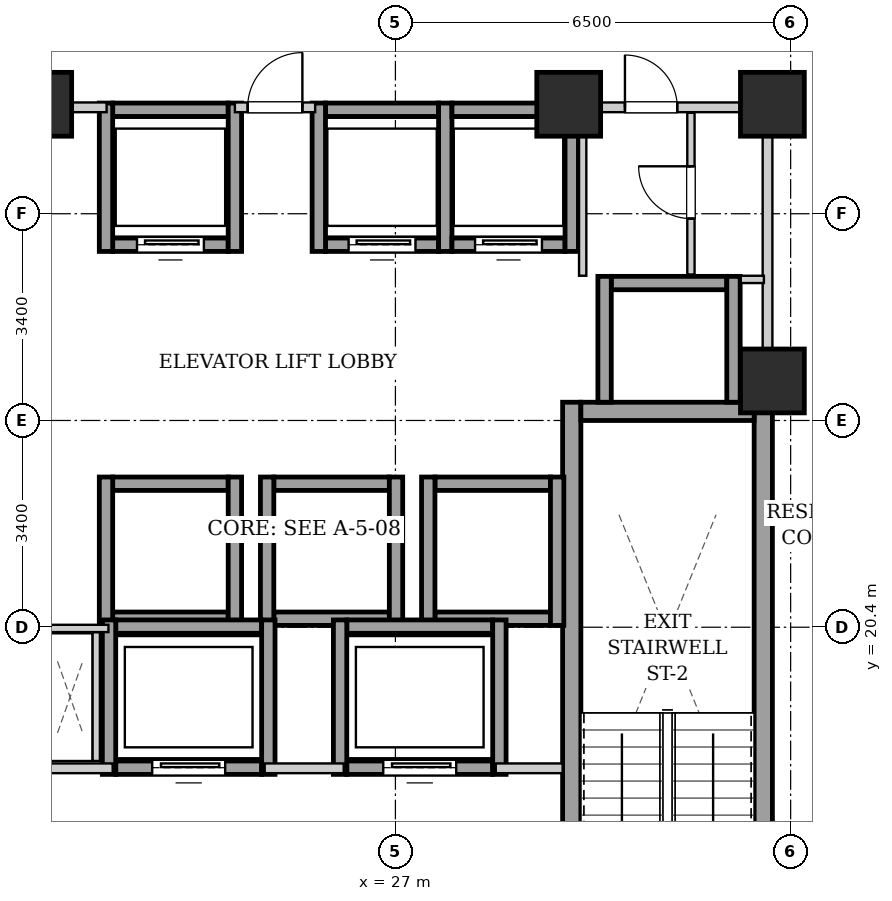
"""IFC4 building model, lengths in metres.
Left out: names, types, materials, properties, quantities, classifications, styles, units other than length and angle.
Written with IfcOpenShell. Run it as: python <this file> out.ifc"""

import sys

from ifc_helpers import new_model, si_unit, direction, frame, frame_2d, origin, origin_2d, place, context, subcontext, project, spatial, rectangle, extrude, element, fill, save


model = new_model("IFC4")
c1 = context("Model", 3, precision=1e-05, world=origin(), true_north=direction((0.0, 1.0)))
c2 = subcontext(c1, "Body", "Model", "MODEL_VIEW")
j1 = project(units=[si_unit("LENGTHUNIT", "METRE"), si_unit("PLANEANGLEUNIT", "RADIAN")], contexts=[c1])
p1 = place(None, origin())
s1 = spatial("IfcSite", under=j1, at=p1, CompositionType="ELEMENT")
p2 = place(p1, origin())
s2 = spatial("IfcBuilding", under=s1, at=p2, CompositionType="ELEMENT")
p3 = place(p2, frame((0.0, 0.0, 75.1)))
s3 = spatial("IfcBuildingStorey", under=s2, at=p3, CompositionType="ELEMENT", Elevation=75.1)
for number, where, z_axis, x_axis in (
    (1, (21.15, 29.0, 0.0), (0.0, 0.0, 1.0), (1.0, 0.0, 0.0)),
    (2, (29.85, 29.0, 0.0), (0.0, 0.0, 1.0), (1.0, 0.0, 0.0)),
    (3, (33.2, 29.0, 0.0), (0.0, 0.0, 1.0), (1.0, 0.0, 0.0)),
    (4, (33.2, 24.45, 0.0), (0.0, 0.0, 1.0), (1.0, 0.0, 0.0)),
):
    element("IfcColumn", number, at=place(p3, frame(where, z_axis=z_axis, x_axis=x_axis)), inside=s3, PredefinedType="COLUMN", context=c2, shape_type="SweptSolid", body=[
        extrude(rectangle(XDim=1.05, YDim=1.05, at=origin_2d()), origin(), (0.0, 0.0, 1.0), 3.2),
    ])
for number, where, z_axis, x_axis in (
    (5, (29.9, 15.1, 0.0), (0.0, 0.0, 1.0), (0.0, 1.0, 0.0)),
    (6, (33.05, 15.1, 0.0), (0.0, 0.0, 1.0), (0.0, 1.0, 0.0)),
):
    element("IfcWall", number, at=place(p3, frame(where, z_axis=z_axis, x_axis=x_axis)), inside=s3, PredefinedType="SHEAR", context=c2, shape_type="SweptSolid", body=[
        extrude(rectangle(XDim=9.0, YDim=0.3, at=frame_2d((4.5, 0.0))), origin(), (0.0, 0.0, 1.0), 2.94),
    ])
p4 = place(p3, frame((30.05, 23.95, 0.0), z_axis=(0.0, 0.0, 1.0), x_axis=(1.0, 0.0, 0.0)))
e7 = element("IfcWall", 7, at=p4, inside=s3, PredefinedType="SHEAR", context=c2, shape_type="SweptSolid", body=[
    extrude(rectangle(XDim=2.85, YDim=0.3, at=frame_2d((1.425, 0.0))), origin(), (0.0, 0.0, 1.0), 2.94),
])
p5 = place(p3, frame((22.35, 26.69, 0.0), z_axis=(0.0, 0.0, 1.0), x_axis=(1.0, 0.0, 0.0)))
e8 = element("IfcWall", 8, at=p5, inside=s3, PredefinedType="SHEAR", context=c2, shape_type="SweptSolid", body=[
    extrude(rectangle(XDim=1.9, YDim=0.22, at=frame_2d((0.95, 0.0))), origin(), (0.0, 0.0, 1.0), 2.94),
])
p6 = place(p5, frame((0.4, 0.0, 0.0)))
e9 = element("IfcOpeningElement", 9, at=p6, cuts=e8, PredefinedType="OPENING", context=c2, shape_type="SweptSolid", body=[
    extrude(rectangle(XDim=1.1, YDim=2.15, at=frame_2d((0.55, 1.075))), frame((0.0, 0.12, 0.0), z_axis=(0.0, -1.0, 0.0), x_axis=(1.0, 0.0, 0.0)), (0.0, 0.0, 1.0), 0.24),
])
p7 = place(p3, frame((22.35, 28.91, 0.0), z_axis=(0.0, 0.0, 1.0), x_axis=(1.0, 0.0, 0.0)))
e10 = element("IfcWall", 10, at=p7, inside=s3, PredefinedType="SHEAR", context=c2, shape_type="SweptSolid", body=[
    extrude(rectangle(XDim=1.9, YDim=0.22, at=frame_2d((0.95, 0.0))), origin(), (0.0, 0.0, 1.0), 2.94),
])
for number, where, z_axis, x_axis in (
    (11, (22.24, 26.58, 0.0), (0.0, 0.0, 1.0), (0.0, 1.0, 0.0)),
    (12, (24.36, 26.58, 0.0), (0.0, 0.0, 1.0), (0.0, 1.0, 0.0)),
):
    element("IfcWall", number, at=place(p3, frame(where, z_axis=z_axis, x_axis=x_axis)), inside=s3, PredefinedType="SHEAR", context=c2, shape_type="SweptSolid", body=[
        extrude(rectangle(XDim=2.44, YDim=0.22, at=frame_2d((1.22, 0.0))), origin(), (0.0, 0.0, 1.0), 2.94),
    ])
p8 = place(p3, frame((25.85, 26.69, 0.0), z_axis=(0.0, 0.0, 1.0), x_axis=(1.0, 0.0, 0.0)))
e13 = element("IfcWall", 13, at=p8, inside=s3, PredefinedType="SHEAR", context=c2, shape_type="SweptSolid", body=[
    extrude(rectangle(XDim=1.86, YDim=0.22, at=frame_2d((0.93, 0.0))), origin(), (0.0, 0.0, 1.0), 2.94),
])
p9 = place(p8, frame((0.38, 0.0, 0.0)))
e14 = element("IfcOpeningElement", 14, at=p9, cuts=e13, PredefinedType="OPENING", context=c2, shape_type="SweptSolid", body=[
    extrude(rectangle(XDim=1.1, YDim=2.15, at=frame_2d((0.55, 1.075))), frame((0.0, 0.12, 0.0), z_axis=(0.0, -1.0, 0.0), x_axis=(1.0, 0.0, 0.0)), (0.0, 0.0, 1.0), 0.24),
])
p10 = place(p3, frame((25.85, 28.91, 0.0), z_axis=(0.0, 0.0, 1.0), x_axis=(1.0, 0.0, 0.0)))
e15 = element("IfcWall", 15, at=p10, inside=s3, PredefinedType="SHEAR", context=c2, shape_type="SweptSolid", body=[
    extrude(rectangle(XDim=1.86, YDim=0.22, at=frame_2d((0.93, 0.0))), origin(), (0.0, 0.0, 1.0), 2.94),
])
for number, where, z_axis, x_axis in (
    (16, (25.74, 26.58, 0.0), (0.0, 0.0, 1.0), (0.0, 1.0, 0.0)),
    (17, (27.82, 26.58, 0.0), (0.0, 0.0, 1.0), (0.0, 1.0, 0.0)),
):
    element("IfcWall", number, at=place(p3, frame(where, z_axis=z_axis, x_axis=x_axis)), inside=s3, PredefinedType="SHEAR", context=c2, shape_type="SweptSolid", body=[
        extrude(rectangle(XDim=2.44, YDim=0.22, at=frame_2d((1.22, 0.0))), origin(), (0.0, 0.0, 1.0), 2.94),
    ])
p11 = place(p3, frame((27.93, 26.69, 0.0), z_axis=(0.0, 0.0, 1.0), x_axis=(1.0, 0.0, 0.0)))
e18 = element("IfcWall", 18, at=p11, inside=s3, PredefinedType="SHEAR", context=c2, shape_type="SweptSolid", body=[
    extrude(rectangle(XDim=1.86, YDim=0.22, at=frame_2d((0.93, 0.0))), origin(), (0.0, 0.0, 1.0), 2.94),
])
p12 = place(p11, frame((0.38, 0.0, 0.0)))
e19 = element("IfcOpeningElement", 19, at=p12, cuts=e18, PredefinedType="OPENING", context=c2, shape_type="SweptSolid", body=[
    extrude(rectangle(XDim=1.1, YDim=2.15, at=frame_2d((0.55, 1.075))), frame((0.0, 0.12, 0.0), z_axis=(0.0, -1.0, 0.0), x_axis=(1.0, 0.0, 0.0)), (0.0, 0.0, 1.0), 0.24),
])
p13 = place(p3, frame((27.93, 28.91, 0.0), z_axis=(0.0, 0.0, 1.0), x_axis=(1.0, 0.0, 0.0)))
e20 = element("IfcWall", 20, at=p13, inside=s3, PredefinedType="SHEAR", context=c2, shape_type="SweptSolid", body=[
    extrude(rectangle(XDim=1.86, YDim=0.22, at=frame_2d((0.93, 0.0))), origin(), (0.0, 0.0, 1.0), 2.94),
])
p14 = place(p3, frame((29.9, 26.58, 0.0), z_axis=(0.0, 0.0, 1.0), x_axis=(0.0, 1.0, 0.0)))
e21 = element("IfcWall", 21, at=p14, inside=s3, PredefinedType="SHEAR", context=c2, shape_type="SweptSolid", body=[
    extrude(rectangle(XDim=2.44, YDim=0.22, at=frame_2d((1.22, 0.0))), origin(), (0.0, 0.0, 1.0), 2.94),
])
for number, where, z_axis, x_axis in (
    (22, (22.35, 20.54, 0.0), (0.0, 0.0, 1.0), (1.0, 0.0, 0.0)),
    (23, (22.35, 22.76, 0.0), (0.0, 0.0, 1.0), (1.0, 0.0, 0.0)),
):
    element("IfcWall", number, at=place(p3, frame(where, z_axis=z_axis, x_axis=x_axis)), inside=s3, PredefinedType="SHEAR", context=c2, shape_type="SweptSolid", body=[
        extrude(rectangle(XDim=1.9, YDim=0.22, at=frame_2d((0.95, 0.0))), origin(), (0.0, 0.0, 1.0), 2.94),
    ])
for number, where, z_axis, x_axis in (
    (24, (22.24, 20.43, 0.0), (0.0, 0.0, 1.0), (0.0, 1.0, 0.0)),
    (25, (24.36, 20.43, 0.0), (0.0, 0.0, 1.0), (0.0, 1.0, 0.0)),
):
    element("IfcWall", number, at=place(p3, frame(where, z_axis=z_axis, x_axis=x_axis)), inside=s3, PredefinedType="SHEAR", context=c2, shape_type="SweptSolid", body=[
        extrude(rectangle(XDim=2.44, YDim=0.22, at=frame_2d((1.22, 0.0))), origin(), (0.0, 0.0, 1.0), 2.94),
    ])
for number, where, z_axis, x_axis in (
    (26, (25.0, 20.54, 0.0), (0.0, 0.0, 1.0), (1.0, 0.0, 0.0)),
    (27, (25.0, 22.76, 0.0), (0.0, 0.0, 1.0), (1.0, 0.0, 0.0)),
):
    element("IfcWall", number, at=place(p3, frame(where, z_axis=z_axis, x_axis=x_axis)), inside=s3, PredefinedType="SHEAR", context=c2, shape_type="SweptSolid", body=[
        extrude(rectangle(XDim=1.9, YDim=0.22, at=frame_2d((0.95, 0.0))), origin(), (0.0, 0.0, 1.0), 2.94),
    ])
for number, where, z_axis, x_axis in (
    (28, (24.89, 20.43, 0.0), (0.0, 0.0, 1.0), (0.0, 1.0, 0.0)),
    (29, (27.01, 20.43, 0.0), (0.0, 0.0, 1.0), (0.0, 1.0, 0.0)),
):
    element("IfcWall", number, at=place(p3, frame(where, z_axis=z_axis, x_axis=x_axis)), inside=s3, PredefinedType="SHEAR", context=c2, shape_type="SweptSolid", body=[
        extrude(rectangle(XDim=2.44, YDim=0.22, at=frame_2d((1.22, 0.0))), origin(), (0.0, 0.0, 1.0), 2.94),
    ])
for number, where, z_axis, x_axis in (
    (30, (27.65, 20.54, 0.0), (0.0, 0.0, 1.0), (1.0, 0.0, 0.0)),
    (31, (27.65, 22.76, 0.0), (0.0, 0.0, 1.0), (1.0, 0.0, 0.0)),
):
    element("IfcWall", number, at=place(p3, frame(where, z_axis=z_axis, x_axis=x_axis)), inside=s3, PredefinedType="SHEAR", context=c2, shape_type="SweptSolid", body=[
        extrude(rectangle(XDim=1.9, YDim=0.22, at=frame_2d((0.95, 0.0))), origin(), (0.0, 0.0, 1.0), 2.94),
    ])
for number, where, z_axis, x_axis in (
    (32, (27.54, 20.43, 0.0), (0.0, 0.0, 1.0), (0.0, 1.0, 0.0)),
    (33, (29.66, 20.43, 0.0), (0.0, 0.0, 1.0), (0.0, 1.0, 0.0)),
):
    element("IfcWall", number, at=place(p3, frame(where, z_axis=z_axis, x_axis=x_axis)), inside=s3, PredefinedType="SHEAR", context=c2, shape_type="SweptSolid", body=[
        extrude(rectangle(XDim=2.44, YDim=0.22, at=frame_2d((1.22, 0.0))), origin(), (0.0, 0.0, 1.0), 2.94),
    ])
p15 = place(p3, frame((30.55, 26.06, 0.0), z_axis=(0.0, 0.0, 1.0), x_axis=(1.0, 0.0, 0.0)))
e34 = element("IfcWall", 34, at=p15, inside=s3, PredefinedType="SHEAR", context=c2, shape_type="SweptSolid", body=[
    extrude(rectangle(XDim=1.9, YDim=0.22, at=frame_2d((0.95, 0.0))), origin(), (0.0, 0.0, 1.0), 2.94),
])
for number, where, z_axis, x_axis in (
    (35, (30.44, 24.1, 0.0), (0.0, 0.0, 1.0), (0.0, 1.0, 0.0)),
    (36, (32.56, 24.1, 0.0), (0.0, 0.0, 1.0), (0.0, 1.0, 0.0)),
):
    element("IfcWall", number, at=place(p3, frame(where, z_axis=z_axis, x_axis=x_axis)), inside=s3, PredefinedType="SHEAR", context=c2, shape_type="SweptSolid", body=[
        extrude(rectangle(XDim=2.07, YDim=0.22, at=frame_2d((1.035, 0.0))), origin(), (0.0, 0.0, 1.0), 2.94),
    ])
p16 = place(p3, frame((22.4, 18.09, 0.0), z_axis=(0.0, 0.0, 1.0), x_axis=(1.0, 0.0, 0.0)))
e37 = element("IfcWall", 37, at=p16, inside=s3, PredefinedType="SHEAR", context=c2, shape_type="SweptSolid", body=[
    extrude(rectangle(XDim=2.4, YDim=0.22, at=frame_2d((1.2, 0.0))), origin(), (0.0, 0.0, 1.0), 2.94),
])
p17 = place(p16, frame((0.6, 0.0, 0.0)))
e38 = element("IfcOpeningElement", 38, at=p17, cuts=e37, PredefinedType="OPENING", context=c2, shape_type="SweptSolid", body=[
    extrude(rectangle(XDim=1.2, YDim=2.15, at=frame_2d((0.6, 1.075))), frame((0.0, 0.12, 0.0), z_axis=(0.0, -1.0, 0.0), x_axis=(1.0, 0.0, 0.0)), (0.0, 0.0, 1.0), 0.24),
])
p18 = place(p3, frame((22.4, 20.41, 0.0), z_axis=(0.0, 0.0, 1.0), x_axis=(1.0, 0.0, 0.0)))
e39 = element("IfcWall", 39, at=p18, inside=s3, PredefinedType="SHEAR", context=c2, shape_type="SweptSolid", body=[
    extrude(rectangle(XDim=2.4, YDim=0.22, at=frame_2d((1.2, 0.0))), origin(), (0.0, 0.0, 1.0), 2.94),
])
for number, where, z_axis, x_axis in (
    (40, (22.29, 17.98, 0.0), (0.0, 0.0, 1.0), (0.0, 1.0, 0.0)),
    (41, (24.91, 17.98, 0.0), (0.0, 0.0, 1.0), (0.0, 1.0, 0.0)),
):
    element("IfcWall", number, at=place(p3, frame(where, z_axis=z_axis, x_axis=x_axis)), inside=s3, PredefinedType="SHEAR", context=c2, shape_type="SweptSolid", body=[
        extrude(rectangle(XDim=2.54, YDim=0.22, at=frame_2d((1.27, 0.0))), origin(), (0.0, 0.0, 1.0), 2.94),
    ])
p19 = place(p3, frame((26.2, 18.09, 0.0), z_axis=(0.0, 0.0, 1.0), x_axis=(1.0, 0.0, 0.0)))
e42 = element("IfcWall", 42, at=p19, inside=s3, PredefinedType="SHEAR", context=c2, shape_type="SweptSolid", body=[
    extrude(rectangle(XDim=2.4, YDim=0.22, at=frame_2d((1.2, 0.0))), origin(), (0.0, 0.0, 1.0), 2.94),
])
p20 = place(p19, frame((0.6, 0.0, 0.0)))
e43 = element("IfcOpeningElement", 43, at=p20, cuts=e42, PredefinedType="OPENING", context=c2, shape_type="SweptSolid", body=[
    extrude(rectangle(XDim=1.2, YDim=2.15, at=frame_2d((0.6, 1.075))), frame((0.0, 0.12, 0.0), z_axis=(0.0, -1.0, 0.0), x_axis=(1.0, 0.0, 0.0)), (0.0, 0.0, 1.0), 0.24),
])
p21 = place(p3, frame((26.2, 20.41, 0.0), z_axis=(0.0, 0.0, 1.0), x_axis=(1.0, 0.0, 0.0)))
e44 = element("IfcWall", 44, at=p21, inside=s3, PredefinedType="SHEAR", context=c2, shape_type="SweptSolid", body=[
    extrude(rectangle(XDim=2.4, YDim=0.22, at=frame_2d((1.2, 0.0))), origin(), (0.0, 0.0, 1.0), 2.94),
])
for number, where, z_axis, x_axis in (
    (45, (26.09, 17.98, 0.0), (0.0, 0.0, 1.0), (0.0, 1.0, 0.0)),
    (46, (28.71, 17.98, 0.0), (0.0, 0.0, 1.0), (0.0, 1.0, 0.0)),
):
    element("IfcWall", number, at=place(p3, frame(where, z_axis=z_axis, x_axis=x_axis)), inside=s3, PredefinedType="SHEAR", context=c2, shape_type="SweptSolid", body=[
        extrude(rectangle(XDim=2.54, YDim=0.22, at=frame_2d((1.27, 0.0))), origin(), (0.0, 0.0, 1.0), 2.94),
    ])
p22 = place(p3, frame((21.25, 18.08, 0.0), z_axis=(0.0, 0.0, 1.0), x_axis=(1.0, 0.0, 0.0)))
e47 = element("IfcWall", 47, at=p22, inside=s3, PredefinedType="PARTITIONING", context=c2, shape_type="SweptSolid", body=[
    extrude(rectangle(XDim=1.1, YDim=0.16, at=frame_2d((0.55, 0.0))), origin(), (0.0, 0.0, 1.0), 2.94),
])
p23 = place(p3, frame((24.85, 18.08, 0.0), z_axis=(0.0, 0.0, 1.0), x_axis=(1.0, 0.0, 0.0)))
e48 = element("IfcWall", 48, at=p23, inside=s3, PredefinedType="PARTITIONING", context=c2, shape_type="SweptSolid", body=[
    extrude(rectangle(XDim=1.3, YDim=0.16, at=frame_2d((0.65, 0.0))), origin(), (0.0, 0.0, 1.0), 2.94),
])
p24 = place(p3, frame((28.65, 18.08, 0.0), z_axis=(0.0, 0.0, 1.0), x_axis=(1.0, 0.0, 0.0)))
e49 = element("IfcWall", 49, at=p24, inside=s3, PredefinedType="PARTITIONING", context=c2, shape_type="SweptSolid", body=[
    extrude(rectangle(XDim=1.1, YDim=0.16, at=frame_2d((0.55, 0.0))), origin(), (0.0, 0.0, 1.0), 2.94),
])
p25 = place(p3, frame((33.12, 24.12, 0.0), z_axis=(0.0, 0.0, 1.0), x_axis=(0.0, 1.0, 0.0)))
e50 = element("IfcWall", 50, at=p25, inside=s3, PredefinedType="PARTITIONING", context=c2, shape_type="SweptSolid", body=[
    extrude(rectangle(XDim=4.76, YDim=0.16, at=frame_2d((2.38, 0.0))), origin(), (0.0, 0.0, 1.0), 2.94),
])
p26 = place(p3, frame((24.36, 28.95, 0.0), z_axis=(0.0, 0.0, 1.0), x_axis=(1.0, 0.0, 0.0)))
e51 = element("IfcWall", 51, at=p26, inside=s3, PredefinedType="PARTITIONING", context=c2, shape_type="SweptSolid", body=[
    extrude(rectangle(XDim=1.32, YDim=0.16, at=frame_2d((0.66, 0.0))), origin(), (0.0, 0.0, 1.0), 2.309),
])
p27 = place(p26, frame((0.21, 0.0, 0.0)))
e52 = element("IfcOpeningElement", 52, at=p27, cuts=e51, PredefinedType="OPENING", context=c2, shape_type="SweptSolid", body=[
    extrude(rectangle(XDim=0.9, YDim=2.05, at=frame_2d((0.45, 1.025))), frame((0.0, 0.09, 0.0), z_axis=(0.0, -1.0, 0.0), x_axis=(1.0, 0.0, 0.0)), (0.0, 0.0, 1.0), 0.18),
])
p28 = place(p3, frame((17.96, 28.95, 0.0), z_axis=(0.0, 0.0, 1.0), x_axis=(1.0, 0.0, 0.0)))
e53 = element("IfcWall", 53, at=p28, inside=s3, PredefinedType="PARTITIONING", context=c2, shape_type="SweptSolid", body=[
    extrude(rectangle(XDim=4.29, YDim=0.16, at=frame_2d((2.145, 0.0))), origin(), (0.0, 0.0, 1.0), 2.309),
])
p29 = place(p28, frame((1.645, 0.0, 0.0)))
e54 = element("IfcOpeningElement", 54, at=p29, cuts=e53, PredefinedType="OPENING", context=c2, shape_type="SweptSolid", body=[
    extrude(rectangle(XDim=0.86, YDim=2.05, at=frame_2d((0.43, 1.025))), frame((0.0, 0.09, 0.0), z_axis=(0.0, -1.0, 0.0), x_axis=(1.0, 0.0, 0.0)), (0.0, 0.0, 1.0), 0.18),
])
p30 = place(p3, frame((22.08, 18.2, 0.0), z_axis=(0.0, 0.0, 1.0), x_axis=(0.0, 1.0, 0.0)))
e55 = element("IfcWall", 55, at=p30, inside=s3, PredefinedType="PARTITIONING", context=c2, shape_type="SweptSolid", body=[
    extrude(rectangle(XDim=2.12, YDim=0.12, at=frame_2d((1.06, 0.0))), origin(), (0.0, 0.0, 1.0), 2.94),
])
p31 = place(p3, frame((22.28, 20.38, 0.0), z_axis=(0.0, 0.0, 1.0), x_axis=(-1.0, 0.0, 0.0)))
e56 = element("IfcWall", 56, at=p31, inside=s3, PredefinedType="PARTITIONING", context=c2, shape_type="SweptSolid", body=[
    extrude(rectangle(XDim=1.02, YDim=0.12, at=frame_2d((0.51, 0.0))), origin(), (0.0, 0.0, 1.0), 2.94),
])
p32 = place(p3, frame((30.08, 26.18, 0.0), z_axis=(0.0, 0.0, 1.0), x_axis=(0.0, 1.0, 0.0)))
e57 = element("IfcWall", 57, at=p32, inside=s3, PredefinedType="PARTITIONING", context=c2, shape_type="SweptSolid", body=[
    extrude(rectangle(XDim=2.68, YDim=0.12, at=frame_2d((1.34, 0.0))), origin(), (0.0, 0.0, 1.0), 2.94),
])
p33 = place(p3, frame((32.68, 26.12, 0.0), z_axis=(0.0, 0.0, 1.0), x_axis=(1.0, 0.0, 0.0)))
e58 = element("IfcWall", 58, at=p33, inside=s3, PredefinedType="PARTITIONING", context=c2, shape_type="SweptSolid", body=[
    extrude(rectangle(XDim=0.38, YDim=0.12, at=frame_2d((0.19, 0.0))), origin(), (0.0, 0.0, 1.0), 2.94),
])
p34 = place(p3, frame((31.86, 26.2, 0.0), z_axis=(0.0, 0.0, 1.0), x_axis=(0.0, 1.0, 0.0)))
e59 = element("IfcWall", 59, at=p34, inside=s3, PredefinedType="PARTITIONING", context=c2, shape_type="SweptSolid", body=[
    extrude(rectangle(XDim=2.66, YDim=0.12, at=frame_2d((1.33, 0.0))), origin(), (0.0, 0.0, 1.0), 2.94),
])
p35 = place(p34, frame((0.92, 0.0, 0.0)))
e60 = element("IfcOpeningElement", 60, at=p35, cuts=e59, PredefinedType="OPENING", context=c2, shape_type="SweptSolid", body=[
    extrude(rectangle(XDim=0.86, YDim=2.05, at=frame_2d((0.43, 1.025))), frame((0.0, 0.07, 0.0), z_axis=(0.0, -1.0, 0.0), x_axis=(1.0, 0.0, 0.0)), (0.0, 0.0, 1.0), 0.14),
])
p36 = place(p3, frame((30.08, 28.95, 0.0), z_axis=(0.0, 0.0, 1.0), x_axis=(1.0, 0.0, 0.0)))
e61 = element("IfcWall", 61, at=p36, inside=s3, PredefinedType="PARTITIONING", context=c2, shape_type="SweptSolid", body=[
    extrude(rectangle(XDim=2.96, YDim=0.16, at=frame_2d((1.48, 0.0))), origin(), (0.0, 0.0, 1.0), 2.94),
])
p37 = place(p36, frame((0.695, 0.0, 0.0)))
e62 = element("IfcOpeningElement", 62, at=p37, cuts=e61, PredefinedType="OPENING", context=c2, shape_type="SweptSolid", body=[
    extrude(rectangle(XDim=0.86, YDim=2.05, at=frame_2d((0.43, 1.025))), frame((0.0, 0.09, 0.0), z_axis=(0.0, -1.0, 0.0), x_axis=(1.0, 0.0, 0.0)), (0.0, 0.0, 1.0), 0.18),
])
p38 = place(p6, origin())
e63 = element("IfcDoor", 63, at=p38, inside=s3, OperationType="SLIDING_TO_LEFT", PredefinedType="DOOR", context=c2, shape_type="SweptSolid", body=[
    extrude(rectangle(XDim=1.1, YDim=2.15, at=frame_2d((0.55, 1.075))), frame((0.0, 0.025, 0.0), z_axis=(0.0, -1.0, 0.0), x_axis=(1.0, 0.0, 0.0)), (0.0, 0.0, 1.0), 0.05),
])
fill(e9, e63)
p39 = place(p9, origin())
e64 = element("IfcDoor", 64, at=p39, inside=s3, OperationType="SLIDING_TO_LEFT", PredefinedType="DOOR", context=c2, shape_type="SweptSolid", body=[
    extrude(rectangle(XDim=1.1, YDim=2.15, at=frame_2d((0.55, 1.075))), frame((0.0, 0.025, 0.0), z_axis=(0.0, -1.0, 0.0), x_axis=(1.0, 0.0, 0.0)), (0.0, 0.0, 1.0), 0.05),
])
fill(e14, e64)
p40 = place(p12, origin())
e65 = element("IfcDoor", 65, at=p40, inside=s3, OperationType="SLIDING_TO_LEFT", PredefinedType="DOOR", context=c2, shape_type="SweptSolid", body=[
    extrude(rectangle(XDim=1.1, YDim=2.15, at=frame_2d((0.55, 1.075))), frame((0.0, 0.025, 0.0), z_axis=(0.0, -1.0, 0.0), x_axis=(1.0, 0.0, 0.0)), (0.0, 0.0, 1.0), 0.05),
])
fill(e19, e65)
p41 = place(p17, origin())
e66 = element("IfcDoor", 66, at=p41, inside=s3, OperationType="SLIDING_TO_LEFT", PredefinedType="DOOR", context=c2, shape_type="SweptSolid", body=[
    extrude(rectangle(XDim=1.2, YDim=2.15, at=frame_2d((0.6, 1.075))), frame((0.0, 0.025, 0.0), z_axis=(0.0, -1.0, 0.0), x_axis=(1.0, 0.0, 0.0)), (0.0, 0.0, 1.0), 0.05),
])
fill(e38, e66)
p42 = place(p20, origin())
e67 = element("IfcDoor", 67, at=p42, inside=s3, OperationType="SLIDING_TO_LEFT", PredefinedType="DOOR", context=c2, shape_type="SweptSolid", body=[
    extrude(rectangle(XDim=1.2, YDim=2.15, at=frame_2d((0.6, 1.075))), frame((0.0, 0.025, 0.0), z_axis=(0.0, -1.0, 0.0), x_axis=(1.0, 0.0, 0.0)), (0.0, 0.0, 1.0), 0.05),
])
fill(e43, e67)
p43 = place(p27, origin())
e68 = element("IfcDoor", 68, at=p43, inside=s3, OperationType="SINGLE_SWING_RIGHT", PredefinedType="DOOR", context=c2, shape_type="SweptSolid", body=[
    extrude(rectangle(XDim=0.9, YDim=2.05, at=frame_2d((0.45, 1.025))), frame((0.0, 0.025, 0.0), z_axis=(0.0, -1.0, 0.0), x_axis=(1.0, 0.0, 0.0)), (0.0, 0.0, 1.0), 0.05),
])
fill(e52, e68)
p44 = place(p35, origin())
e69 = element("IfcDoor", 69, at=p44, inside=s3, OperationType="SINGLE_SWING_RIGHT", PredefinedType="DOOR", context=c2, shape_type="SweptSolid", body=[
    extrude(rectangle(XDim=0.86, YDim=2.05, at=frame_2d((0.43, 1.025))), frame((0.0, 0.025, 0.0), z_axis=(0.0, -1.0, 0.0), x_axis=(1.0, 0.0, 0.0)), (0.0, 0.0, 1.0), 0.05),
])
fill(e60, e69)
p45 = place(p37, origin())
e70 = element("IfcDoor", 70, at=p45, inside=s3, OperationType="SINGLE_SWING_LEFT", PredefinedType="DOOR", context=c2, shape_type="SweptSolid", body=[
    extrude(rectangle(XDim=0.86, YDim=2.05, at=frame_2d((0.43, 1.025))), frame((0.0, 0.025, 0.0), z_axis=(0.0, -1.0, 0.0), x_axis=(1.0, 0.0, 0.0)), (0.0, 0.0, 1.0), 0.05),
])
fill(e62, e70)
save(model, sys.argv[1])
